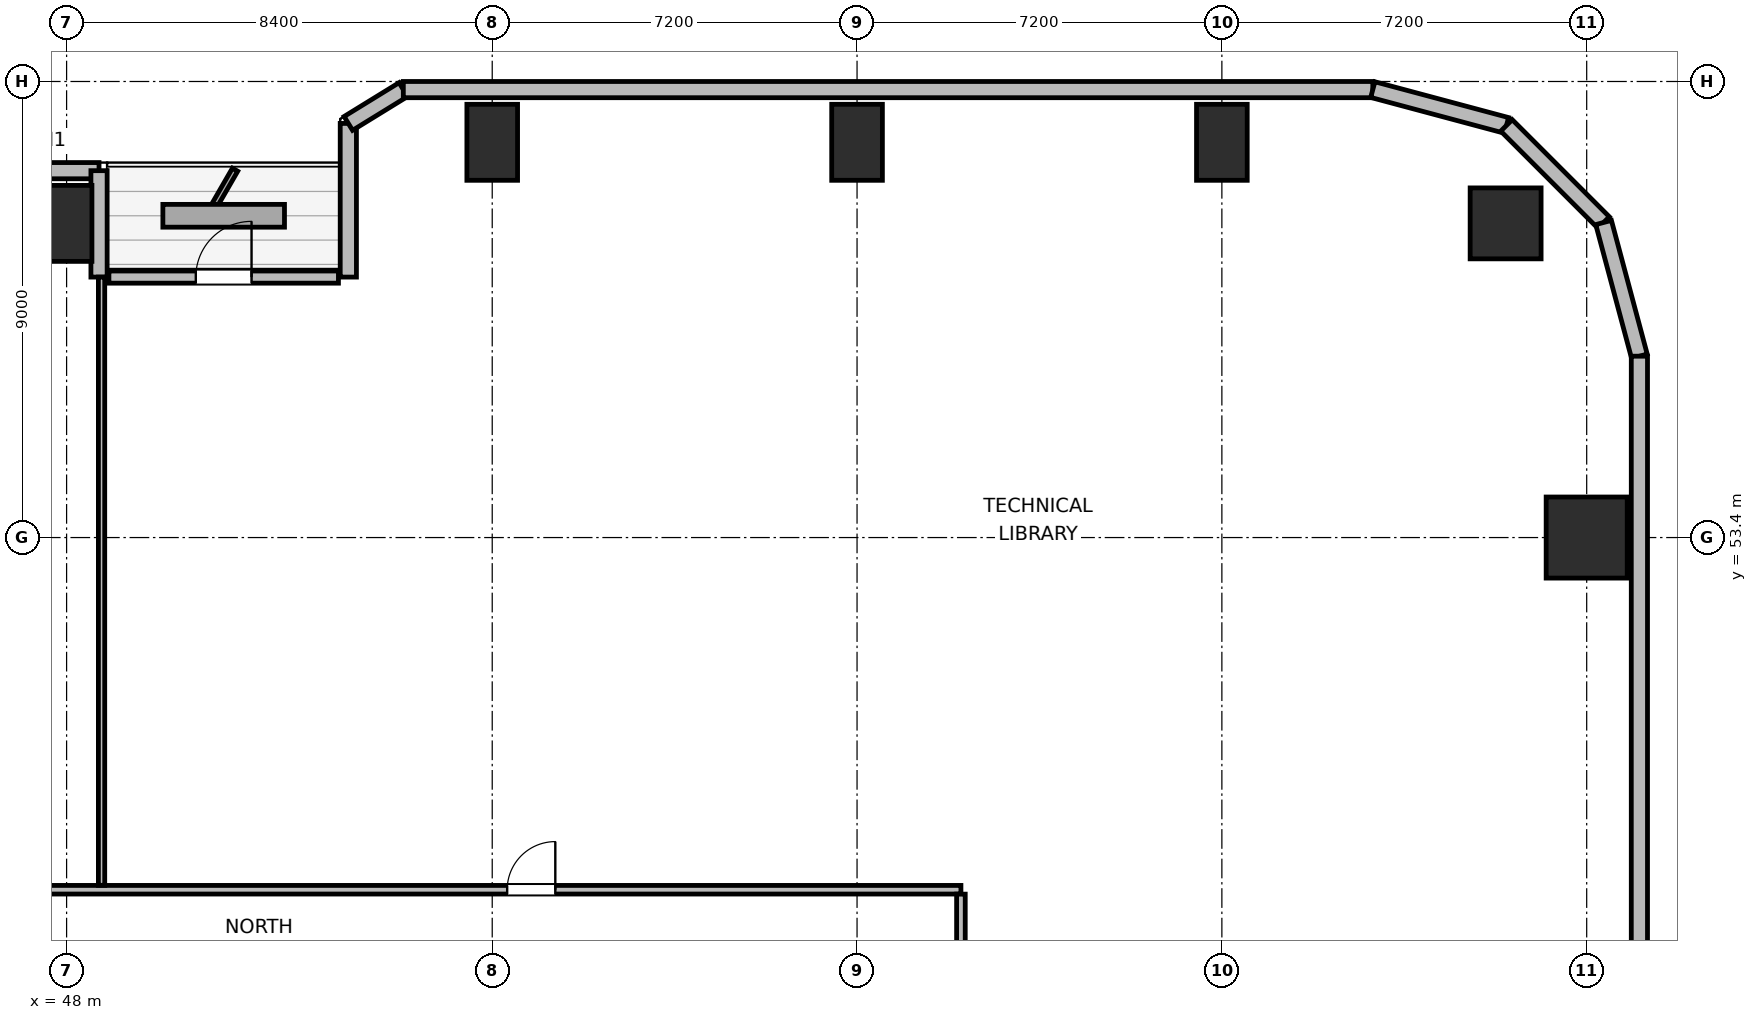
"""IFC4 building model, lengths in metres.
Left out: names, types, materials, properties, quantities, classifications, styles, units other than length and angle.
Written with IfcOpenShell. Run it as: python <this file> out.ifc"""

import sys

from ifc_helpers import new_model, si_unit, direction, frame, frame_2d, origin, origin_2d, place, context, subcontext, project, spatial, rectangle, circle, extrude, element, fill, save


model = new_model("IFC4")
c1 = context("Model", 3, precision=1e-05, world=origin(), true_north=direction((0.0, 1.0)))
c2 = subcontext(c1, "Body", "Model", "MODEL_VIEW")
j1 = project(units=[si_unit("LENGTHUNIT", "METRE"), si_unit("PLANEANGLEUNIT", "RADIAN")], contexts=[c1])
p1 = place(None, origin())
s1 = spatial("IfcSite", under=j1, at=p1, CompositionType="ELEMENT")
p2 = place(p1, origin())
s2 = spatial("IfcBuilding", under=s1, at=p2, CompositionType="ELEMENT")
p3 = place(p2, frame((0.0, 0.0, 29.4)))
s3 = spatial("IfcBuildingStorey", under=s2, at=p3, CompositionType="ELEMENT", Elevation=29.4)
p4 = place(p3, frame((76.4, 59.6, 0.0), z_axis=(0.0, 0.0, 1.0), x_axis=(1.0, 0.0, 0.0)))
e1 = element("IfcColumn", 1, at=p4, inside=s3, PredefinedType="COLUMN", context=c2, shape_type="SweptSolid", body=[
    extrude(circle(Radius=0.7, at=origin_2d()), origin(), (0.0, 0.0, 1.0), 3.9),
])
for number, where, z_axis, x_axis in (
    (2, (48.0, 59.6, 0.0), (0.0, 0.0, 1.0), (1.0, 0.0, 0.0)),
    (3, (56.4, 61.2, 0.0), (0.0, 0.0, 1.0), (1.0, 0.0, 0.0)),
    (4, (63.6, 61.2, 0.0), (0.0, 0.0, 1.0), (1.0, 0.0, 0.0)),
    (5, (70.8, 61.2, 0.0), (0.0, 0.0, 1.0), (1.0, 0.0, 0.0)),
):
    element("IfcColumn", number, at=place(p3, frame(where, z_axis=z_axis, x_axis=x_axis)), inside=s3, PredefinedType="COLUMN", context=c2, shape_type="SweptSolid", body=[
        extrude(rectangle(XDim=1.0, YDim=1.5, at=origin_2d()), origin(), (0.0, 0.0, 1.0), 3.9),
    ])
p5 = place(p3, frame((78.0, 53.4, 0.0), z_axis=(0.0, 0.0, 1.0), x_axis=(1.0, 0.0, 0.0)))
e6 = element("IfcColumn", 6, at=p5, inside=s3, PredefinedType="COLUMN", context=c2, shape_type="SweptSolid", body=[
    extrude(rectangle(XDim=1.6, YDim=1.6, at=origin_2d()), origin(), (0.0, 0.0, 1.0), 3.9),
])
p6 = place(p3, frame((43.955, 60.64, 0.0), z_axis=(0.0, 0.0, 1.0), x_axis=(1.0, 0.0, 0.0)))
e7 = element("IfcWall", 7, at=p6, inside=s3, PredefinedType="SOLIDWALL", context=c2, shape_type="SweptSolid", body=[
    extrude(rectangle(XDim=4.685, YDim=0.32, at=frame_2d((2.343, 0.0))), origin(), (0.0, 0.0, 1.0), 2.875),
])
p7 = place(p6, frame((1.443, 0.0, 0.85)))
e8 = element("IfcOpeningElement", 8, at=p7, cuts=e7, PredefinedType="OPENING", context=c2, shape_type="SweptSolid", body=[
    extrude(rectangle(XDim=1.8, YDim=1.1, at=frame_2d((0.9, 0.55))), frame((0.0, 0.17, 0.0), z_axis=(0.0, -1.0, 0.0), x_axis=(1.0, 0.0, 0.0)), (0.0, 0.0, 1.0), 0.34),
])
p8 = place(p3, frame((48.64, 60.64, 0.0), z_axis=(0.0, 0.0, 1.0), x_axis=(0.0, -1.0, 0.0)))
e9 = element("IfcWall", 9, at=p8, inside=s3, PredefinedType="SOLIDWALL", context=c2, shape_type="SweptSolid", body=[
    extrude(rectangle(XDim=2.1, YDim=0.32, at=frame_2d((1.05, 0.0))), origin(), (0.0, 0.0, 1.0), 2.875),
])
p9 = place(p3, frame((48.835, 58.54, 0.0), z_axis=(0.0, 0.0, 1.0), x_axis=(1.0, 0.0, 0.0)))
e10 = element("IfcWall", 10, at=p9, inside=s3, PredefinedType="SOLIDWALL", context=c2, shape_type="SweptSolid", body=[
    extrude(rectangle(XDim=4.53, YDim=0.24, at=frame_2d((2.265, 0.0))), origin(), (0.0, 0.0, 1.0), 3.64),
])
p10 = place(p9, frame((1.715, 0.0, 0.0)))
e11 = element("IfcOpeningElement", 11, at=p10, cuts=e10, PredefinedType="OPENING", context=c2, shape_type="SweptSolid", body=[
    extrude(rectangle(XDim=1.1, YDim=2.04, at=frame_2d((0.55, 1.02))), frame((0.0, 0.13, 0.0), z_axis=(0.0, -1.0, 0.0), x_axis=(1.0, 0.0, 0.0)), (0.0, 0.0, 1.0), 0.26),
])
p11 = place(p3, frame((53.56, 58.54, 0.0), z_axis=(0.0, 0.0, 1.0), x_axis=(0.0, 1.0, 0.0)))
e12 = element("IfcWall", 12, at=p11, inside=s3, PredefinedType="SOLIDWALL", context=c2, shape_type="SweptSolid", body=[
    extrude(rectangle(XDim=3.032, YDim=0.32, at=frame_2d((1.516, 0.0))), origin(), (0.0, 0.0, 1.0), 2.875),
])
p12 = place(p3, frame((53.56, 61.573, 0.0), z_axis=(0.0, 0.0, 1.0), x_axis=(0.851776724646, 0.523904964045, 0.0)))
e13 = element("IfcWall", 13, at=p12, inside=s3, PredefinedType="SOLIDWALL", context=c2, shape_type="SweptSolid", body=[
    extrude(rectangle(XDim=1.274, YDim=0.32, at=frame_2d((0.637, 0.0))), origin(), (0.0, 0.0, 1.0), 3.64),
])
p13 = place(p3, frame((54.645, 62.24, 0.0), z_axis=(0.0, 0.0, 1.0), x_axis=(1.0, 0.0, 0.0)))
e14 = element("IfcWall", 14, at=p13, inside=s3, PredefinedType="SOLIDWALL", context=c2, shape_type="SweptSolid", body=[
    extrude(rectangle(XDim=19.134, YDim=0.32, at=frame_2d((9.567, 0.0))), origin(), (0.0, 0.0, 1.0), 3.64),
])
p14 = place(p3, frame((73.779, 62.24, 0.0), z_axis=(0.0, 0.0, 1.0), x_axis=(0.965964405026, -0.25867502435, 0.0)))
e15 = element("IfcWall", 15, at=p14, inside=s3, PredefinedType="SOLIDWALL", context=c2, shape_type="SweptSolid", body=[
    extrude(rectangle(XDim=2.731, YDim=0.32, at=frame_2d((1.366, 0.0))), origin(), (0.0, 0.0, 1.0), 3.64),
])
p15 = place(p3, frame((76.417, 61.533, 0.0), z_axis=(0.0, 0.0, 1.0), x_axis=(0.707106781187, -0.707106781187, 0.0)))
e16 = element("IfcWall", 16, at=p15, inside=s3, PredefinedType="SOLIDWALL", context=c2, shape_type="SweptSolid", body=[
    extrude(rectangle(XDim=2.71, YDim=0.32, at=frame_2d((1.355, 0.0))), origin(), (0.0, 0.0, 1.0), 3.64),
])
p16 = place(p3, frame((78.333, 59.617, 0.0), z_axis=(0.0, 0.0, 1.0), x_axis=(0.25869736047, -0.965958423373, 0.0)))
e17 = element("IfcWall", 17, at=p16, inside=s3, PredefinedType="SOLIDWALL", context=c2, shape_type="SweptSolid", body=[
    extrude(rectangle(XDim=2.731, YDim=0.32, at=frame_2d((1.366, 0.0))), origin(), (0.0, 0.0, 1.0), 3.64),
])
p17 = place(p3, frame((79.04, 56.979, 0.0), z_axis=(0.0, 0.0, 1.0), x_axis=(0.0, -1.0, 0.0)))
e18 = element("IfcWall", 18, at=p17, inside=s3, PredefinedType="SOLIDWALL", context=c2, shape_type="SweptSolid", body=[
    extrude(rectangle(XDim=14.219, YDim=0.32, at=frame_2d((7.109, 0.0))), origin(), (0.0, 0.0, 1.0), 3.64),
])
p18 = place(p3, frame((30.35, 46.45, 0.0), z_axis=(0.0, 0.0, 1.0), x_axis=(1.0, 0.0, 0.0)))
e19 = element("IfcWall", 19, at=p18, inside=s3, PredefinedType="PARTITIONING", context=c2, shape_type="SweptSolid", body=[
    extrude(rectangle(XDim=35.3, YDim=0.17, at=frame_2d((17.65, 0.0))), origin(), (0.0, 0.0, 1.0), 3.64),
])
p19 = place(p18, frame((6.21, 0.0, 0.0)))
e20 = element("IfcOpeningElement", 20, at=p19, cuts=e19, PredefinedType="OPENING", context=c2, shape_type="SweptSolid", body=[
    extrude(rectangle(XDim=0.95, YDim=2.04, at=frame_2d((0.475, 1.02))), frame((0.0, 0.095, 0.0), z_axis=(0.0, -1.0, 0.0), x_axis=(1.0, 0.0, 0.0)), (0.0, 0.0, 1.0), 0.19),
])
p20 = place(p18, frame((15.38, 0.0, 0.0)))
e21 = element("IfcOpeningElement", 21, at=p20, cuts=e19, PredefinedType="OPENING", context=c2, shape_type="SweptSolid", body=[
    extrude(rectangle(XDim=0.95, YDim=2.04, at=frame_2d((0.475, 1.02))), frame((0.0, 0.095, 0.0), z_axis=(0.0, -1.0, 0.0), x_axis=(1.0, 0.0, 0.0)), (0.0, 0.0, 1.0), 0.19),
])
p21 = place(p18, frame((26.345, 0.0, 0.0)))
e22 = element("IfcOpeningElement", 22, at=p21, cuts=e19, PredefinedType="OPENING", context=c2, shape_type="SweptSolid", body=[
    extrude(rectangle(XDim=0.95, YDim=2.04, at=frame_2d((0.475, 1.02))), frame((0.0, 0.095, 0.0), z_axis=(0.0, -1.0, 0.0), x_axis=(1.0, 0.0, 0.0)), (0.0, 0.0, 1.0), 0.19),
])
p22 = place(p3, frame((65.65, 25.637, 0.0), z_axis=(0.0, 0.0, 1.0), x_axis=(0.0, 1.0, 0.0)))
e23 = element("IfcWall", 23, at=p22, inside=s3, PredefinedType="PARTITIONING", context=c2, shape_type="SweptSolid", body=[
    extrude(rectangle(XDim=20.726, YDim=0.17, at=frame_2d((10.363, 0.0))), origin(), (0.0, 0.0, 1.0), 3.64),
])
p23 = place(p22, frame((4.163, 0.0, 0.0)))
e24 = element("IfcOpeningElement", 24, at=p23, cuts=e23, PredefinedType="OPENING", context=c2, shape_type="SweptSolid", body=[
    extrude(rectangle(XDim=0.95, YDim=2.04, at=frame_2d((0.475, 1.02))), frame((0.0, 0.095, 0.0), z_axis=(0.0, -1.0, 0.0), x_axis=(1.0, 0.0, 0.0)), (0.0, 0.0, 1.0), 0.19),
])
p24 = place(p22, frame((14.613, 0.0, 0.0)))
e25 = element("IfcOpeningElement", 25, at=p24, cuts=e23, PredefinedType="OPENING", context=c2, shape_type="SweptSolid", body=[
    extrude(rectangle(XDim=0.95, YDim=2.04, at=frame_2d((0.475, 1.02))), frame((0.0, 0.095, 0.0), z_axis=(0.0, -1.0, 0.0), x_axis=(1.0, 0.0, 0.0)), (0.0, 0.0, 1.0), 0.19),
])
p25 = place(p3, frame((48.69, 46.537, 0.0), z_axis=(0.0, 0.0, 1.0), x_axis=(0.0, 1.0, 0.0)))
e26 = element("IfcWall", 26, at=p25, inside=s3, PredefinedType="PARTITIONING", context=c2, shape_type="SweptSolid", body=[
    extrude(rectangle(XDim=12.003, YDim=0.125, at=frame_2d((6.001, 0.0))), origin(), (0.0, 0.0, 1.0), 3.64),
])
p26 = place(p10, origin())
e27 = element("IfcDoor", 27, at=p26, inside=s3, OperationType="SINGLE_SWING_RIGHT", PredefinedType="DOOR", context=c2, shape_type="SweptSolid", body=[
    extrude(rectangle(XDim=1.1, YDim=2.04, at=frame_2d((0.55, 1.02))), frame((0.0, 0.025, 0.0), z_axis=(0.0, -1.0, 0.0), x_axis=(1.0, 0.0, 0.0)), (0.0, 0.0, 1.0), 0.05),
])
fill(e11, e27)
p27 = place(p21, origin())
e28 = element("IfcDoor", 28, at=p27, inside=s3, OperationType="SINGLE_SWING_RIGHT", PredefinedType="DOOR", context=c2, shape_type="SweptSolid", body=[
    extrude(rectangle(XDim=0.95, YDim=2.04, at=frame_2d((0.475, 1.02))), frame((0.0, 0.025, 0.0), z_axis=(0.0, -1.0, 0.0), x_axis=(1.0, 0.0, 0.0)), (0.0, 0.0, 1.0), 0.05),
])
fill(e22, e28)
save(model, sys.argv[1])
